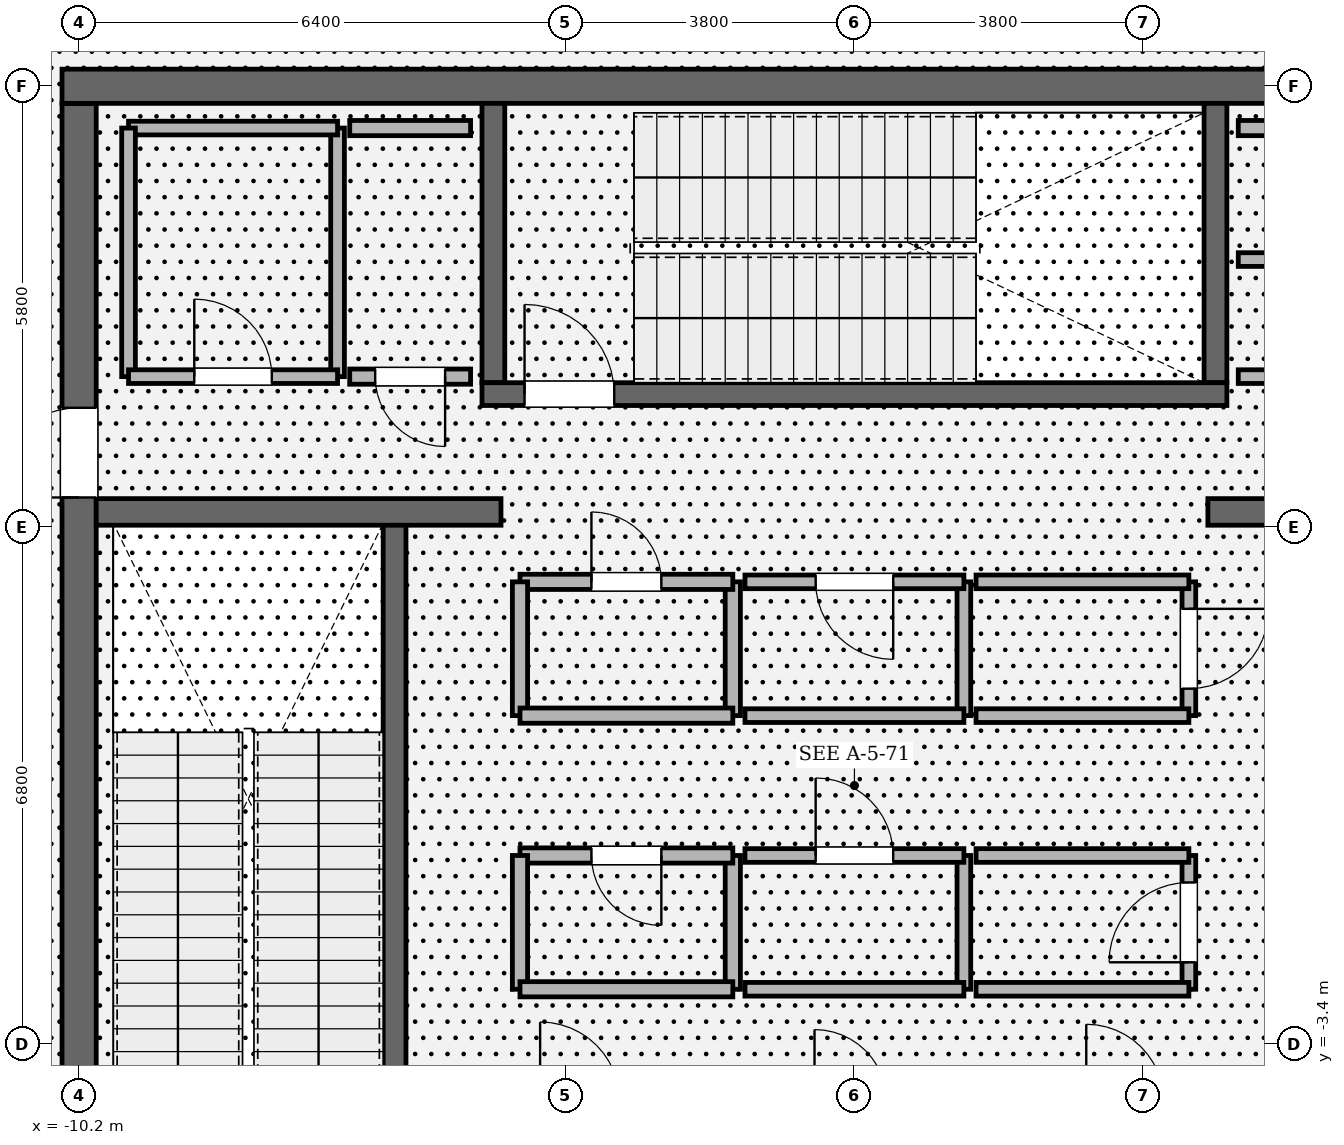
"""IFC4 building model, lengths in metres.
Left out: names, types, materials, properties, quantities, classifications, styles, units other than length and angle.
Written with IfcOpenShell. Run it as: python <this file> out.ifc"""

import sys

from ifc_helpers import new_model, si_unit, direction, frame, frame_2d, origin, place, context, subcontext, project, spatial, rectangle, extrude, element, fill, save


model = new_model("IFC4")
c1 = context("Model", 3, precision=1e-05, world=origin(), true_north=direction((0.0, 1.0)))
c2 = subcontext(c1, "Body", "Model", "MODEL_VIEW")
j1 = project(units=[si_unit("LENGTHUNIT", "METRE"), si_unit("PLANEANGLEUNIT", "RADIAN")], contexts=[c1])
p1 = place(None, origin())
s1 = spatial("IfcSite", under=j1, at=p1, CompositionType="ELEMENT")
p2 = place(p1, origin())
s2 = spatial("IfcBuilding", under=s1, at=p2, CompositionType="ELEMENT")
p3 = place(p2, frame((0.0, 0.0, 339.0)))
s3 = spatial("IfcBuildingStorey", under=s2, at=p3, CompositionType="ELEMENT", Elevation=339.0)
p4 = place(p3, frame((-10.2, -8.975, 0.0), z_axis=(0.0, 0.0, 1.0), x_axis=(0.0, 1.0, 0.0)))
e1 = element("IfcWall", 1, at=p4, inside=s3, PredefinedType="SHEAR", context=c2, shape_type="SweptSolid", body=[
    extrude(rectangle(XDim=17.95, YDim=0.45, at=frame_2d((8.975, 0.0))), origin(), (0.0, 0.0, 1.0), 4.8),
])
p5 = place(p4, frame((12.765, 0.0, 0.0)))
e2 = element("IfcOpeningElement", 2, at=p5, cuts=e1, PredefinedType="OPENING", context=c2, shape_type="SweptSolid", body=[
    extrude(rectangle(XDim=1.18, YDim=2.2, at=frame_2d((0.59, 1.1))), frame((0.0, 0.235, 0.0), z_axis=(0.0, -1.0, 0.0), x_axis=(1.0, 0.0, 0.0)), (0.0, 0.0, 1.0), 0.47),
])
p6 = place(p3, frame((-10.425, 9.2, 0.0), z_axis=(0.0, 0.0, 1.0), x_axis=(1.0, 0.0, 0.0)))
e3 = element("IfcWall", 3, at=p6, inside=s3, PredefinedType="SHEAR", context=c2, shape_type="SweptSolid", body=[
    extrude(rectangle(XDim=20.85, YDim=0.45, at=frame_2d((10.425, 0.0))), origin(), (0.0, 0.0, 1.0), 4.8),
])
p7 = place(p3, frame((-6.05, -5.5, 0.0), z_axis=(0.0, 0.0, 1.0), x_axis=(0.0, 1.0, 0.0)))
e4 = element("IfcWall", 4, at=p7, inside=s3, PredefinedType="SOLIDWALL", context=c2, shape_type="SweptSolid", body=[
    extrude(rectangle(XDim=8.95, YDim=0.3, at=frame_2d((4.475, 0.0))), origin(), (0.0, 0.0, 1.0), 4.8),
])
for number, where, z_axis, x_axis in (
    (5, (-4.75, 5.3, 0.0), (0.0, 0.0, 1.0), (0.0, 1.0, 0.0)),
    (6, (4.75, 8.975, 0.0), (0.0, 0.0, 1.0), (0.0, -1.0, 0.0)),
):
    element("IfcWall", number, at=place(p3, frame(where, z_axis=z_axis, x_axis=x_axis)), inside=s3, PredefinedType="SOLIDWALL", context=c2, shape_type="SweptSolid", body=[
        extrude(rectangle(XDim=3.675, YDim=0.3, at=frame_2d((1.837, 0.0))), origin(), (0.0, 0.0, 1.0), 4.8),
    ])
p8 = place(p3, frame((-4.9, 5.15, 0.0), z_axis=(0.0, 0.0, 1.0), x_axis=(1.0, 0.0, 0.0)))
e7 = element("IfcWall", 7, at=p8, inside=s3, PredefinedType="SOLIDWALL", context=c2, shape_type="SweptSolid", body=[
    extrude(rectangle(XDim=9.8, YDim=0.3, at=frame_2d((4.9, 0.0))), origin(), (0.0, 0.0, 1.0), 4.8),
])
p9 = place(p8, frame((0.56, 0.0, 0.0)))
e8 = element("IfcOpeningElement", 8, at=p9, cuts=e7, PredefinedType="OPENING", context=c2, shape_type="SweptSolid", body=[
    extrude(rectangle(XDim=1.18, YDim=2.2, at=frame_2d((0.59, 1.1))), frame((0.0, 0.16, 0.0), z_axis=(0.0, -1.0, 0.0), x_axis=(1.0, 0.0, 0.0)), (0.0, 0.0, 1.0), 0.32),
])
for number, where, z_axis, x_axis in (
    (9, (-9.975, 3.6, 0.0), (0.0, 0.0, 1.0), (1.0, 0.0, 0.0)),
    (10, (4.65, 3.6, 0.0), (0.0, 0.0, 1.0), (1.0, 0.0, 0.0)),
):
    element("IfcWall", number, at=place(p3, frame(where, z_axis=z_axis, x_axis=x_axis)), inside=s3, PredefinedType="SOLIDWALL", context=c2, shape_type="SweptSolid", body=[
        extrude(rectangle(XDim=5.325, YDim=0.35, at=frame_2d((2.663, 0.0))), origin(), (0.0, 0.0, 1.0), 4.8),
    ])
p10 = place(p3, frame((-1.6, -2.68, 0.0), z_axis=(0.0, 0.0, 1.0), x_axis=(0.0, 1.0, 0.0)))
e11 = element("IfcWall", 11, at=p10, inside=s3, PredefinedType="SOLIDWALL", context=c2, shape_type="SweptSolid", body=[
    extrude(rectangle(XDim=1.76, YDim=0.2, at=frame_2d((0.88, 0.0))), origin(), (0.0, 0.0, 1.0), 4.52),
])
p11 = place(p3, frame((-1.6, -0.92, 0.0), z_axis=(0.0, 0.0, 1.0), x_axis=(-1.0, 0.0, 0.0)))
e12 = element("IfcWall", 12, at=p11, inside=s3, PredefinedType="SOLIDWALL", context=c2, shape_type="SweptSolid", body=[
    extrude(rectangle(XDim=2.8, YDim=0.2, at=frame_2d((1.4, 0.0))), origin(), (0.0, 0.0, 1.0), 4.52),
])
p12 = place(p11, frame((0.94, 0.0, 0.0)))
e13 = element("IfcOpeningElement", 13, at=p12, cuts=e12, PredefinedType="OPENING", context=c2, shape_type="SweptSolid", body=[
    extrude(rectangle(XDim=0.92, YDim=2.1, at=frame_2d((0.46, 1.05))), frame((0.0, 0.11, 0.0), z_axis=(0.0, -1.0, 0.0), x_axis=(1.0, 0.0, 0.0)), (0.0, 0.0, 1.0), 0.22),
])
p13 = place(p3, frame((-4.4, -0.92, 0.0), z_axis=(0.0, 0.0, 1.0), x_axis=(0.0, -1.0, 0.0)))
e14 = element("IfcWall", 14, at=p13, inside=s3, PredefinedType="SOLIDWALL", context=c2, shape_type="SweptSolid", body=[
    extrude(rectangle(XDim=1.76, YDim=0.2, at=frame_2d((0.88, 0.0))), origin(), (0.0, 0.0, 1.0), 4.52),
])
p14 = place(p3, frame((-4.4, -2.68, 0.0), z_axis=(0.0, 0.0, 1.0), x_axis=(1.0, 0.0, 0.0)))
e15 = element("IfcWall", 15, at=p14, inside=s3, PredefinedType="SOLIDWALL", context=c2, shape_type="SweptSolid", body=[
    extrude(rectangle(XDim=2.8, YDim=0.2, at=frame_2d((1.4, 0.0))), origin(), (0.0, 0.0, 1.0), 4.52),
])
p15 = place(p3, frame((1.44, -2.68, 0.0), z_axis=(0.0, 0.0, 1.0), x_axis=(0.0, 1.0, 0.0)))
e16 = element("IfcWall", 16, at=p15, inside=s3, PredefinedType="PARTITIONING", context=c2, shape_type="SweptSolid", body=[
    extrude(rectangle(XDim=1.76, YDim=0.18, at=frame_2d((0.88, 0.0))), origin(), (0.0, 0.0, 1.0), 4.52),
])
p16 = place(p3, frame((1.44, -0.92, 0.0), z_axis=(0.0, 0.0, 1.0), x_axis=(-1.0, 0.0, 0.0)))
e17 = element("IfcWall", 17, at=p16, inside=s3, PredefinedType="PARTITIONING", context=c2, shape_type="SweptSolid", body=[
    extrude(rectangle(XDim=2.88, YDim=0.18, at=frame_2d((1.44, 0.0))), origin(), (0.0, 0.0, 1.0), 4.52),
])
p17 = place(p16, frame((0.93, 0.0, 0.0)))
e18 = element("IfcOpeningElement", 18, at=p17, cuts=e17, PredefinedType="OPENING", context=c2, shape_type="SweptSolid", body=[
    extrude(rectangle(XDim=1.02, YDim=2.2, at=frame_2d((0.51, 1.1))), frame((0.0, 0.1, 0.0), z_axis=(0.0, -1.0, 0.0), x_axis=(1.0, 0.0, 0.0)), (0.0, 0.0, 1.0), 0.2),
])
p18 = place(p3, frame((-1.44, -2.68, 0.0), z_axis=(0.0, 0.0, 1.0), x_axis=(1.0, 0.0, 0.0)))
e19 = element("IfcWall", 19, at=p18, inside=s3, PredefinedType="PARTITIONING", context=c2, shape_type="SweptSolid", body=[
    extrude(rectangle(XDim=2.88, YDim=0.18, at=frame_2d((1.44, 0.0))), origin(), (0.0, 0.0, 1.0), 4.52),
])
p19 = place(p3, frame((4.4, -2.68, 0.0), z_axis=(0.0, 0.0, 1.0), x_axis=(0.0, 1.0, 0.0)))
e20 = element("IfcWall", 20, at=p19, inside=s3, PredefinedType="PARTITIONING", context=c2, shape_type="SweptSolid", body=[
    extrude(rectangle(XDim=1.76, YDim=0.18, at=frame_2d((0.88, 0.0))), origin(), (0.0, 0.0, 1.0), 4.52),
])
p20 = place(p19, frame((0.355, 0.0, 0.0)))
e21 = element("IfcOpeningElement", 21, at=p20, cuts=e20, PredefinedType="OPENING", context=c2, shape_type="SweptSolid", body=[
    extrude(rectangle(XDim=1.05, YDim=2.2, at=frame_2d((0.525, 1.1))), frame((0.0, 0.1, 0.0), z_axis=(0.0, -1.0, 0.0), x_axis=(1.0, 0.0, 0.0)), (0.0, 0.0, 1.0), 0.2),
])
for number, where, z_axis, x_axis in (
    (22, (4.4, -0.92, 0.0), (0.0, 0.0, 1.0), (-1.0, 0.0, 0.0)),
    (23, (1.6, -2.68, 0.0), (0.0, 0.0, 1.0), (1.0, 0.0, 0.0)),
):
    element("IfcWall", number, at=place(p3, frame(where, z_axis=z_axis, x_axis=x_axis)), inside=s3, PredefinedType="PARTITIONING", context=c2, shape_type="SweptSolid", body=[
        extrude(rectangle(XDim=2.8, YDim=0.18, at=frame_2d((1.4, 0.0))), origin(), (0.0, 0.0, 1.0), 4.52),
    ])
p21 = place(p3, frame((-1.6, 0.92, 0.0), z_axis=(0.0, 0.0, 1.0), x_axis=(0.0, 1.0, 0.0)))
e24 = element("IfcWall", 24, at=p21, inside=s3, PredefinedType="SOLIDWALL", context=c2, shape_type="SweptSolid", body=[
    extrude(rectangle(XDim=1.76, YDim=0.2, at=frame_2d((0.88, 0.0))), origin(), (0.0, 0.0, 1.0), 4.52),
])
p22 = place(p3, frame((-1.6, 2.68, 0.0), z_axis=(0.0, 0.0, 1.0), x_axis=(-1.0, 0.0, 0.0)))
e25 = element("IfcWall", 25, at=p22, inside=s3, PredefinedType="SOLIDWALL", context=c2, shape_type="SweptSolid", body=[
    extrude(rectangle(XDim=2.8, YDim=0.2, at=frame_2d((1.4, 0.0))), origin(), (0.0, 0.0, 1.0), 4.52),
])
p23 = place(p22, frame((0.94, 0.0, 0.0)))
e26 = element("IfcOpeningElement", 26, at=p23, cuts=e25, PredefinedType="OPENING", context=c2, shape_type="SweptSolid", body=[
    extrude(rectangle(XDim=0.92, YDim=2.1, at=frame_2d((0.46, 1.05))), frame((0.0, 0.11, 0.0), z_axis=(0.0, -1.0, 0.0), x_axis=(1.0, 0.0, 0.0)), (0.0, 0.0, 1.0), 0.22),
])
p24 = place(p3, frame((-4.4, 2.68, 0.0), z_axis=(0.0, 0.0, 1.0), x_axis=(0.0, -1.0, 0.0)))
e27 = element("IfcWall", 27, at=p24, inside=s3, PredefinedType="SOLIDWALL", context=c2, shape_type="SweptSolid", body=[
    extrude(rectangle(XDim=1.76, YDim=0.2, at=frame_2d((0.88, 0.0))), origin(), (0.0, 0.0, 1.0), 4.52),
])
p25 = place(p3, frame((-4.4, 0.92, 0.0), z_axis=(0.0, 0.0, 1.0), x_axis=(1.0, 0.0, 0.0)))
e28 = element("IfcWall", 28, at=p25, inside=s3, PredefinedType="SOLIDWALL", context=c2, shape_type="SweptSolid", body=[
    extrude(rectangle(XDim=2.8, YDim=0.2, at=frame_2d((1.4, 0.0))), origin(), (0.0, 0.0, 1.0), 4.52),
])
p26 = place(p3, frame((1.44, 0.92, 0.0), z_axis=(0.0, 0.0, 1.0), x_axis=(0.0, 1.0, 0.0)))
e29 = element("IfcWall", 29, at=p26, inside=s3, PredefinedType="PARTITIONING", context=c2, shape_type="SweptSolid", body=[
    extrude(rectangle(XDim=1.76, YDim=0.18, at=frame_2d((0.88, 0.0))), origin(), (0.0, 0.0, 1.0), 4.52),
])
p27 = place(p3, frame((1.44, 2.68, 0.0), z_axis=(0.0, 0.0, 1.0), x_axis=(-1.0, 0.0, 0.0)))
e30 = element("IfcWall", 30, at=p27, inside=s3, PredefinedType="PARTITIONING", context=c2, shape_type="SweptSolid", body=[
    extrude(rectangle(XDim=2.88, YDim=0.18, at=frame_2d((1.44, 0.0))), origin(), (0.0, 0.0, 1.0), 4.52),
])
p28 = place(p27, frame((0.93, 0.0, 0.0)))
e31 = element("IfcOpeningElement", 31, at=p28, cuts=e30, PredefinedType="OPENING", context=c2, shape_type="SweptSolid", body=[
    extrude(rectangle(XDim=1.02, YDim=2.2, at=frame_2d((0.51, 1.1))), frame((0.0, 0.1, 0.0), z_axis=(0.0, -1.0, 0.0), x_axis=(1.0, 0.0, 0.0)), (0.0, 0.0, 1.0), 0.2),
])
p29 = place(p3, frame((-1.44, 0.92, 0.0), z_axis=(0.0, 0.0, 1.0), x_axis=(1.0, 0.0, 0.0)))
e32 = element("IfcWall", 32, at=p29, inside=s3, PredefinedType="PARTITIONING", context=c2, shape_type="SweptSolid", body=[
    extrude(rectangle(XDim=2.88, YDim=0.18, at=frame_2d((1.44, 0.0))), origin(), (0.0, 0.0, 1.0), 4.52),
])
p30 = place(p3, frame((4.4, 0.92, 0.0), z_axis=(0.0, 0.0, 1.0), x_axis=(0.0, 1.0, 0.0)))
e33 = element("IfcWall", 33, at=p30, inside=s3, PredefinedType="PARTITIONING", context=c2, shape_type="SweptSolid", body=[
    extrude(rectangle(XDim=1.76, YDim=0.18, at=frame_2d((0.88, 0.0))), origin(), (0.0, 0.0, 1.0), 4.52),
])
p31 = place(p30, frame((0.355, 0.0, 0.0)))
e34 = element("IfcOpeningElement", 34, at=p31, cuts=e33, PredefinedType="OPENING", context=c2, shape_type="SweptSolid", body=[
    extrude(rectangle(XDim=1.05, YDim=2.2, at=frame_2d((0.525, 1.1))), frame((0.0, 0.1, 0.0), z_axis=(0.0, -1.0, 0.0), x_axis=(1.0, 0.0, 0.0)), (0.0, 0.0, 1.0), 0.2),
])
for number, where, z_axis, x_axis in (
    (35, (4.4, 2.68, 0.0), (0.0, 0.0, 1.0), (-1.0, 0.0, 0.0)),
    (36, (1.6, 0.92, 0.0), (0.0, 0.0, 1.0), (1.0, 0.0, 0.0)),
):
    element("IfcWall", number, at=place(p3, frame(where, z_axis=z_axis, x_axis=x_axis)), inside=s3, PredefinedType="PARTITIONING", context=c2, shape_type="SweptSolid", body=[
        extrude(rectangle(XDim=2.8, YDim=0.18, at=frame_2d((1.4, 0.0))), origin(), (0.0, 0.0, 1.0), 4.52),
    ])
p32 = place(p3, frame((-6.8, 5.38, 0.0), z_axis=(0.0, 0.0, 1.0), x_axis=(0.0, 1.0, 0.0)))
e37 = element("IfcWall", 37, at=p32, inside=s3, PredefinedType="PARTITIONING", context=c2, shape_type="SweptSolid", body=[
    extrude(rectangle(XDim=3.27, YDim=0.18, at=frame_2d((1.635, 0.0))), origin(), (0.0, 0.0, 1.0), 4.52),
])
p33 = place(p3, frame((-6.8, 8.65, 0.0), z_axis=(0.0, 0.0, 1.0), x_axis=(-1.0, 0.0, 0.0)))
e38 = element("IfcWall", 38, at=p33, inside=s3, PredefinedType="PARTITIONING", context=c2, shape_type="SweptSolid", body=[
    extrude(rectangle(XDim=2.75, YDim=0.18, at=frame_2d((1.375, 0.0))), origin(), (0.0, 0.0, 1.0), 4.52),
])
p34 = place(p3, frame((-9.55, 8.65, 0.0), z_axis=(0.0, 0.0, 1.0), x_axis=(0.0, -1.0, 0.0)))
e39 = element("IfcWall", 39, at=p34, inside=s3, PredefinedType="PARTITIONING", context=c2, shape_type="SweptSolid", body=[
    extrude(rectangle(XDim=3.27, YDim=0.18, at=frame_2d((1.635, 0.0))), origin(), (0.0, 0.0, 1.0), 4.52),
])
p35 = place(p3, frame((-9.55, 5.38, 0.0), z_axis=(0.0, 0.0, 1.0), x_axis=(1.0, 0.0, 0.0)))
e40 = element("IfcWall", 40, at=p35, inside=s3, PredefinedType="PARTITIONING", context=c2, shape_type="SweptSolid", body=[
    extrude(rectangle(XDim=2.75, YDim=0.18, at=frame_2d((1.375, 0.0))), origin(), (0.0, 0.0, 1.0), 4.52),
])
p36 = place(p35, frame((0.865, 0.0, 0.0)))
e41 = element("IfcOpeningElement", 41, at=p36, cuts=e40, PredefinedType="OPENING", context=c2, shape_type="SweptSolid", body=[
    extrude(rectangle(XDim=1.02, YDim=2.2, at=frame_2d((0.51, 1.1))), frame((0.0, 0.1, 0.0), z_axis=(0.0, -1.0, 0.0), x_axis=(1.0, 0.0, 0.0)), (0.0, 0.0, 1.0), 0.2),
])
p37 = place(p3, frame((-5.05, 8.65, 0.0), z_axis=(0.0, 0.0, 1.0), x_axis=(-1.0, 0.0, 0.0)))
e42 = element("IfcWall", 42, at=p37, inside=s3, PredefinedType="SOLIDWALL", context=c2, shape_type="SweptSolid", body=[
    extrude(rectangle(XDim=1.59, YDim=0.2, at=frame_2d((0.795, 0.0))), origin(), (0.0, 0.0, 1.0), 4.52),
])
p38 = place(p3, frame((-6.64, 5.38, 0.0), z_axis=(0.0, 0.0, 1.0), x_axis=(1.0, 0.0, 0.0)))
e43 = element("IfcWall", 43, at=p38, inside=s3, PredefinedType="SOLIDWALL", context=c2, shape_type="SweptSolid", body=[
    extrude(rectangle(XDim=1.59, YDim=0.2, at=frame_2d((0.795, 0.0))), origin(), (0.0, 0.0, 1.0), 4.52),
])
p39 = place(p38, frame((0.335, 0.0, 0.0)))
e44 = element("IfcOpeningElement", 44, at=p39, cuts=e43, PredefinedType="OPENING", context=c2, shape_type="SweptSolid", body=[
    extrude(rectangle(XDim=0.92, YDim=2.1, at=frame_2d((0.46, 1.05))), frame((0.0, 0.11, 0.0), z_axis=(0.0, -1.0, 0.0), x_axis=(1.0, 0.0, 0.0)), (0.0, 0.0, 1.0), 0.22),
])
p40 = place(p3, frame((9.55, 6.92, 0.0), z_axis=(0.0, 0.0, 1.0), x_axis=(-1.0, 0.0, 0.0)))
e45 = element("IfcWall", 45, at=p40, inside=s3, PredefinedType="PARTITIONING", context=c2, shape_type="SweptSolid", body=[
    extrude(rectangle(XDim=4.5, YDim=0.18, at=frame_2d((2.25, 0.0))), origin(), (0.0, 0.0, 1.0), 4.52),
])
p41 = place(p40, frame((1.79, 0.0, 0.0)))
e46 = element("IfcOpeningElement", 46, at=p41, cuts=e45, PredefinedType="OPENING", context=c2, shape_type="SweptSolid", body=[
    extrude(rectangle(XDim=0.92, YDim=2.1, at=frame_2d((0.46, 1.05))), frame((0.0, 0.1, 0.0), z_axis=(0.0, -1.0, 0.0), x_axis=(1.0, 0.0, 0.0)), (0.0, 0.0, 1.0), 0.2),
])
p42 = place(p3, frame((5.05, 5.38, 0.0), z_axis=(0.0, 0.0, 1.0), x_axis=(1.0, 0.0, 0.0)))
e47 = element("IfcWall", 47, at=p42, inside=s3, PredefinedType="PARTITIONING", context=c2, shape_type="SweptSolid", body=[
    extrude(rectangle(XDim=4.5, YDim=0.18, at=frame_2d((2.25, 0.0))), origin(), (0.0, 0.0, 1.0), 4.52),
])
p43 = place(p42, frame((1.725, 0.0, 0.0)))
e48 = element("IfcOpeningElement", 48, at=p43, cuts=e47, PredefinedType="OPENING", context=c2, shape_type="SweptSolid", body=[
    extrude(rectangle(XDim=1.05, YDim=2.2, at=frame_2d((0.525, 1.1))), frame((0.0, 0.1, 0.0), z_axis=(0.0, -1.0, 0.0), x_axis=(1.0, 0.0, 0.0)), (0.0, 0.0, 1.0), 0.2),
])
p44 = place(p3, frame((9.55, 8.65, 0.0), z_axis=(0.0, 0.0, 1.0), x_axis=(-1.0, 0.0, 0.0)))
e49 = element("IfcWall", 49, at=p44, inside=s3, PredefinedType="SOLIDWALL", context=c2, shape_type="SweptSolid", body=[
    extrude(rectangle(XDim=4.5, YDim=0.2, at=frame_2d((2.25, 0.0))), origin(), (0.0, 0.0, 1.0), 4.52),
])
p45 = place(p9, origin())
e50 = element("IfcDoor", 50, at=p45, inside=s3, OperationType="SINGLE_SWING_LEFT", PredefinedType="DOOR", context=c2, shape_type="SweptSolid", body=[
    extrude(rectangle(XDim=1.18, YDim=2.2, at=frame_2d((0.59, 1.1))), frame((0.0, 0.025, 0.0), z_axis=(0.0, -1.0, 0.0), x_axis=(1.0, 0.0, 0.0)), (0.0, 0.0, 1.0), 0.05),
])
fill(e8, e50)
p46 = place(p5, origin())
e51 = element("IfcDoor", 51, at=p46, inside=s3, OperationType="SINGLE_SWING_LEFT", PredefinedType="DOOR", context=c2, shape_type="SweptSolid", body=[
    extrude(rectangle(XDim=1.18, YDim=2.2, at=frame_2d((0.59, 1.1))), frame((0.0, 0.025, 0.0), z_axis=(0.0, -1.0, 0.0), x_axis=(1.0, 0.0, 0.0)), (0.0, 0.0, 1.0), 0.05),
])
fill(e2, e51)
p47 = place(p12, origin())
e52 = element("IfcDoor", 52, at=p47, inside=s3, OperationType="SINGLE_SWING_LEFT", PredefinedType="DOOR", context=c2, shape_type="SweptSolid", body=[
    extrude(rectangle(XDim=0.92, YDim=2.1, at=frame_2d((0.46, 1.05))), frame((0.0, 0.025, 0.0), z_axis=(0.0, -1.0, 0.0), x_axis=(1.0, 0.0, 0.0)), (0.0, 0.0, 1.0), 0.05),
])
fill(e13, e52)
p48 = place(p17, origin())
e53 = element("IfcDoor", 53, at=p48, inside=s3, OperationType="SINGLE_SWING_RIGHT", PredefinedType="DOOR", context=c2, shape_type="SweptSolid", body=[
    extrude(rectangle(XDim=1.02, YDim=2.2, at=frame_2d((0.51, 1.1))), frame((0.0, 0.025, 0.0), z_axis=(0.0, -1.0, 0.0), x_axis=(1.0, 0.0, 0.0)), (0.0, 0.0, 1.0), 0.05),
])
fill(e18, e53)
p49 = place(p20, origin())
e54 = element("IfcDoor", 54, at=p49, inside=s3, OperationType="SINGLE_SWING_LEFT", PredefinedType="DOOR", context=c2, shape_type="SweptSolid", body=[
    extrude(rectangle(XDim=1.05, YDim=2.2, at=frame_2d((0.525, 1.1))), frame((0.0, 0.025, 0.0), z_axis=(0.0, -1.0, 0.0), x_axis=(1.0, 0.0, 0.0)), (0.0, 0.0, 1.0), 0.05),
])
fill(e21, e54)
p50 = place(p23, origin())
e55 = element("IfcDoor", 55, at=p50, inside=s3, OperationType="SINGLE_SWING_RIGHT", PredefinedType="DOOR", context=c2, shape_type="SweptSolid", body=[
    extrude(rectangle(XDim=0.92, YDim=2.1, at=frame_2d((0.46, 1.05))), frame((0.0, 0.025, 0.0), z_axis=(0.0, -1.0, 0.0), x_axis=(1.0, 0.0, 0.0)), (0.0, 0.0, 1.0), 0.05),
])
fill(e26, e55)
p51 = place(p28, origin())
e56 = element("IfcDoor", 56, at=p51, inside=s3, OperationType="SINGLE_SWING_LEFT", PredefinedType="DOOR", context=c2, shape_type="SweptSolid", body=[
    extrude(rectangle(XDim=1.02, YDim=2.2, at=frame_2d((0.51, 1.1))), frame((0.0, 0.025, 0.0), z_axis=(0.0, -1.0, 0.0), x_axis=(1.0, 0.0, 0.0)), (0.0, 0.0, 1.0), 0.05),
])
fill(e31, e56)
p52 = place(p31, origin())
e57 = element("IfcDoor", 57, at=p52, inside=s3, OperationType="SINGLE_SWING_RIGHT", PredefinedType="DOOR", context=c2, shape_type="SweptSolid", body=[
    extrude(rectangle(XDim=1.05, YDim=2.2, at=frame_2d((0.525, 1.1))), frame((0.0, 0.025, 0.0), z_axis=(0.0, -1.0, 0.0), x_axis=(1.0, 0.0, 0.0)), (0.0, 0.0, 1.0), 0.05),
])
fill(e34, e57)
p53 = place(p36, origin())
e58 = element("IfcDoor", 58, at=p53, inside=s3, OperationType="SINGLE_SWING_LEFT", PredefinedType="DOOR", context=c2, shape_type="SweptSolid", body=[
    extrude(rectangle(XDim=1.02, YDim=2.2, at=frame_2d((0.51, 1.1))), frame((0.0, 0.025, 0.0), z_axis=(0.0, -1.0, 0.0), x_axis=(1.0, 0.0, 0.0)), (0.0, 0.0, 1.0), 0.05),
])
fill(e41, e58)
p54 = place(p39, origin())
e59 = element("IfcDoor", 59, at=p54, inside=s3, OperationType="SINGLE_SWING_RIGHT", PredefinedType="DOOR", context=c2, shape_type="SweptSolid", body=[
    extrude(rectangle(XDim=0.92, YDim=2.1, at=frame_2d((0.46, 1.05))), frame((0.0, 0.025, 0.0), z_axis=(0.0, -1.0, 0.0), x_axis=(1.0, 0.0, 0.0)), (0.0, 0.0, 1.0), 0.05),
])
fill(e44, e59)
save(model, sys.argv[1])
